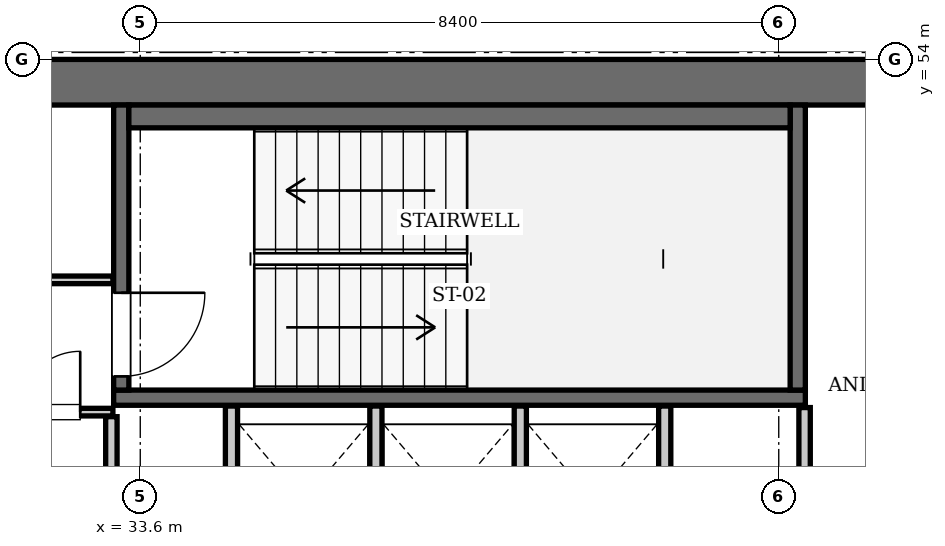
"""IFC4 building model, lengths in metres.
Left out: names, types, materials, properties, quantities, classifications, styles, units other than length and angle.
Written with IfcOpenShell. Run it as: python <this file> out.ifc"""

import sys

from ifc_helpers import new_model, si_unit, direction, frame, frame_2d, origin, place, context, subcontext, project, spatial, rectangle, extrude, element, fill, save


model = new_model("IFC4")
c1 = context("Model", 3, precision=1e-05, world=origin(), true_north=direction((0.0, 1.0)))
c2 = subcontext(c1, "Body", "Model", "MODEL_VIEW")
j1 = project(units=[si_unit("LENGTHUNIT", "METRE"), si_unit("PLANEANGLEUNIT", "RADIAN")], contexts=[c1])
p1 = place(None, origin())
s1 = spatial("IfcSite", under=j1, at=p1, CompositionType="ELEMENT")
p2 = place(p1, origin())
s2 = spatial("IfcBuilding", under=s1, at=p2, CompositionType="ELEMENT")
p3 = place(p2, frame((0.0, 0.0, 333.55)))
s3 = spatial("IfcBuildingStorey", under=s2, at=p3, CompositionType="ELEMENT", Elevation=333.55)
p4 = place(p3, frame((25.2, 53.7, 0.0), z_axis=(0.0, 0.0, 1.0), x_axis=(1.0, 0.0, 0.0)))
e1 = element("IfcWall", 1, at=p4, inside=s3, PredefinedType="SHEAR", context=c2, shape_type="SweptSolid", body=[
    extrude(rectangle(XDim=25.2, YDim=0.6, at=frame_2d((12.6, 0.0))), origin(), (0.0, 0.0, 1.0), 3.85),
])
p5 = place(p3, frame((33.25, 49.55, 0.0), z_axis=(0.0, 0.0, 1.0), x_axis=(1.0, 0.0, 0.0)))
e2 = element("IfcWall", 2, at=p5, inside=s3, PredefinedType="SOLIDWALL", context=c2, shape_type="SweptSolid", body=[
    extrude(rectangle(XDim=9.1, YDim=0.2, at=frame_2d((4.55, 0.0))), origin(), (0.0, 0.0, 1.0), 3.61),
])
p6 = place(p3, frame((42.25, 49.65, 0.0), z_axis=(0.0, 0.0, 1.0), x_axis=(0.0, 1.0, 0.0)))
e3 = element("IfcWall", 3, at=p6, inside=s3, PredefinedType="SOLIDWALL", context=c2, shape_type="SweptSolid", body=[
    extrude(rectangle(XDim=3.75, YDim=0.2, at=frame_2d((1.875, 0.0))), origin(), (0.0, 0.0, 1.0), 3.61),
])
p7 = place(p3, frame((33.35, 49.65, 0.0), z_axis=(0.0, 0.0, 1.0), x_axis=(0.0, 1.0, 0.0)))
e4 = element("IfcWall", 4, at=p7, inside=s3, PredefinedType="SOLIDWALL", context=c2, shape_type="SweptSolid", body=[
    extrude(rectangle(XDim=3.75, YDim=0.2, at=frame_2d((1.875, 0.0))), origin(), (0.0, 0.0, 1.0), 3.61),
])
p8 = place(p7, frame((0.18, 0.0, 0.0)))
e5 = element("IfcOpeningElement", 5, at=p8, cuts=e4, PredefinedType="OPENING", context=c2, shape_type="SweptSolid", body=[
    extrude(rectangle(XDim=1.1, YDim=2.15, at=frame_2d((0.55, 1.075))), frame((0.0, 0.11, 0.0), z_axis=(0.0, -1.0, 0.0), x_axis=(1.0, 0.0, 0.0)), (0.0, 0.0, 1.0), 0.22),
])
p9 = place(p3, frame((33.45, 53.25, 0.0), z_axis=(0.0, 0.0, 1.0), x_axis=(1.0, 0.0, 0.0)))
e6 = element("IfcWall", 6, at=p9, inside=s3, PredefinedType="SOLIDWALL", context=c2, shape_type="SweptSolid", body=[
    extrude(rectangle(XDim=8.7, YDim=0.3, at=frame_2d((4.35, 0.0))), origin(), (0.0, 0.0, 1.0), 3.61),
])
for number, where, z_axis, x_axis in (
    (7, (34.8, 47.25, 0.0), (0.0, 0.0, 1.0), (0.0, 1.0, 0.0)),
    (8, (36.7, 47.25, 0.0), (0.0, 0.0, 1.0), (0.0, 1.0, 0.0)),
    (9, (38.6, 47.25, 0.0), (0.0, 0.0, 1.0), (0.0, 1.0, 0.0)),
    (10, (40.5, 47.25, 0.0), (0.0, 0.0, 1.0), (0.0, 1.0, 0.0)),
):
    element("IfcWall", number, at=place(p3, frame(where, z_axis=z_axis, x_axis=x_axis)), inside=s3, PredefinedType="SOLIDWALL", context=c2, shape_type="SweptSolid", body=[
        extrude(rectangle(XDim=2.19, YDim=0.16, at=frame_2d((1.095, 0.0))), origin(), (0.0, 0.0, 1.0), 3.61),
    ])
p10 = place(p3, frame((33.22, 45.14, 0.0), z_axis=(0.0, 0.0, 1.0), x_axis=(0.0, 1.0, 0.0)))
e11 = element("IfcWall", 11, at=p10, inside=s3, PredefinedType="PARTITIONING", context=c2, shape_type="SweptSolid", body=[
    extrude(rectangle(XDim=4.16, YDim=0.15, at=frame_2d((2.08, 0.0))), origin(), (0.0, 0.0, 1.0), 3.61),
])
p11 = place(p3, frame((30.06, 49.36, 0.0), z_axis=(0.0, 0.0, 1.0), x_axis=(1.0, 0.0, 0.0)))
e12 = element("IfcWall", 12, at=p11, inside=s3, PredefinedType="PARTITIONING", context=c2, shape_type="SweptSolid", body=[
    extrude(rectangle(XDim=3.18, YDim=0.1, at=frame_2d((1.59, 0.0))), origin(), (0.0, 0.0, 1.0), 3.61),
])
p12 = place(p11, frame((1.95, 0.0, 0.0)))
e13 = element("IfcOpeningElement", 13, at=p12, cuts=e12, PredefinedType="OPENING", context=c2, shape_type="SweptSolid", body=[
    extrude(rectangle(XDim=0.8, YDim=2.05, at=frame_2d((0.4, 1.025))), frame((0.0, 0.06, 0.0), z_axis=(0.0, -1.0, 0.0), x_axis=(1.0, 0.0, 0.0)), (0.0, 0.0, 1.0), 0.12),
])
p13 = place(p3, frame((31.82, 51.1, 0.0), z_axis=(0.0, 0.0, 1.0), x_axis=(1.0, 0.0, 0.0)))
e14 = element("IfcWall", 14, at=p13, inside=s3, PredefinedType="PARTITIONING", context=c2, shape_type="SweptSolid", body=[
    extrude(rectangle(XDim=1.42, YDim=0.1, at=frame_2d((0.71, 0.0))), origin(), (0.0, 0.0, 1.0), 3.61),
])
p14 = place(p3, frame((42.34, 46.96, 0.0), z_axis=(0.0, 0.0, 1.0), x_axis=(0.0, 1.0, 0.0)))
e15 = element("IfcWall", 15, at=p14, inside=s3, PredefinedType="PARTITIONING", context=c2, shape_type="SweptSolid", body=[
    extrude(rectangle(XDim=2.46, YDim=0.15, at=frame_2d((1.23, 0.0))), origin(), (0.0, 0.0, 1.0), 3.61),
])
p15 = place(p14, frame((0.24, 0.0, 0.0)))
e16 = element("IfcOpeningElement", 16, at=p15, cuts=e15, PredefinedType="OPENING", context=c2, shape_type="SweptSolid", body=[
    extrude(rectangle(XDim=0.8, YDim=2.05, at=frame_2d((0.4, 1.025))), frame((0.0, 0.085, 0.0), z_axis=(0.0, -1.0, 0.0), x_axis=(1.0, 0.0, 0.0)), (0.0, 0.0, 1.0), 0.17),
])
p16 = place(p8, frame((1.1, 0.0, 0.0), z_axis=(0.0, 0.0, 1.0), x_axis=(-1.0, 0.0, 0.0)))
e17 = element("IfcDoor", 17, at=p16, inside=s3, OperationType="SINGLE_SWING_LEFT", PredefinedType="DOOR", context=c2, shape_type="SweptSolid", body=[
    extrude(rectangle(XDim=1.1, YDim=2.15, at=frame_2d((0.55, 1.075))), frame((0.0, 0.025, 0.0), z_axis=(0.0, -1.0, 0.0), x_axis=(1.0, 0.0, 0.0)), (0.0, 0.0, 1.0), 0.05),
])
fill(e5, e17)
p17 = place(p12, origin())
e18 = element("IfcDoor", 18, at=p17, inside=s3, OperationType="SINGLE_SWING_RIGHT", PredefinedType="DOOR", context=c2, shape_type="SweptSolid", body=[
    extrude(rectangle(XDim=0.8, YDim=2.05, at=frame_2d((0.4, 1.025))), frame((0.0, 0.025, 0.0), z_axis=(0.0, -1.0, 0.0), x_axis=(1.0, 0.0, 0.0)), (0.0, 0.0, 1.0), 0.05),
])
fill(e13, e18)
save(model, sys.argv[1])
